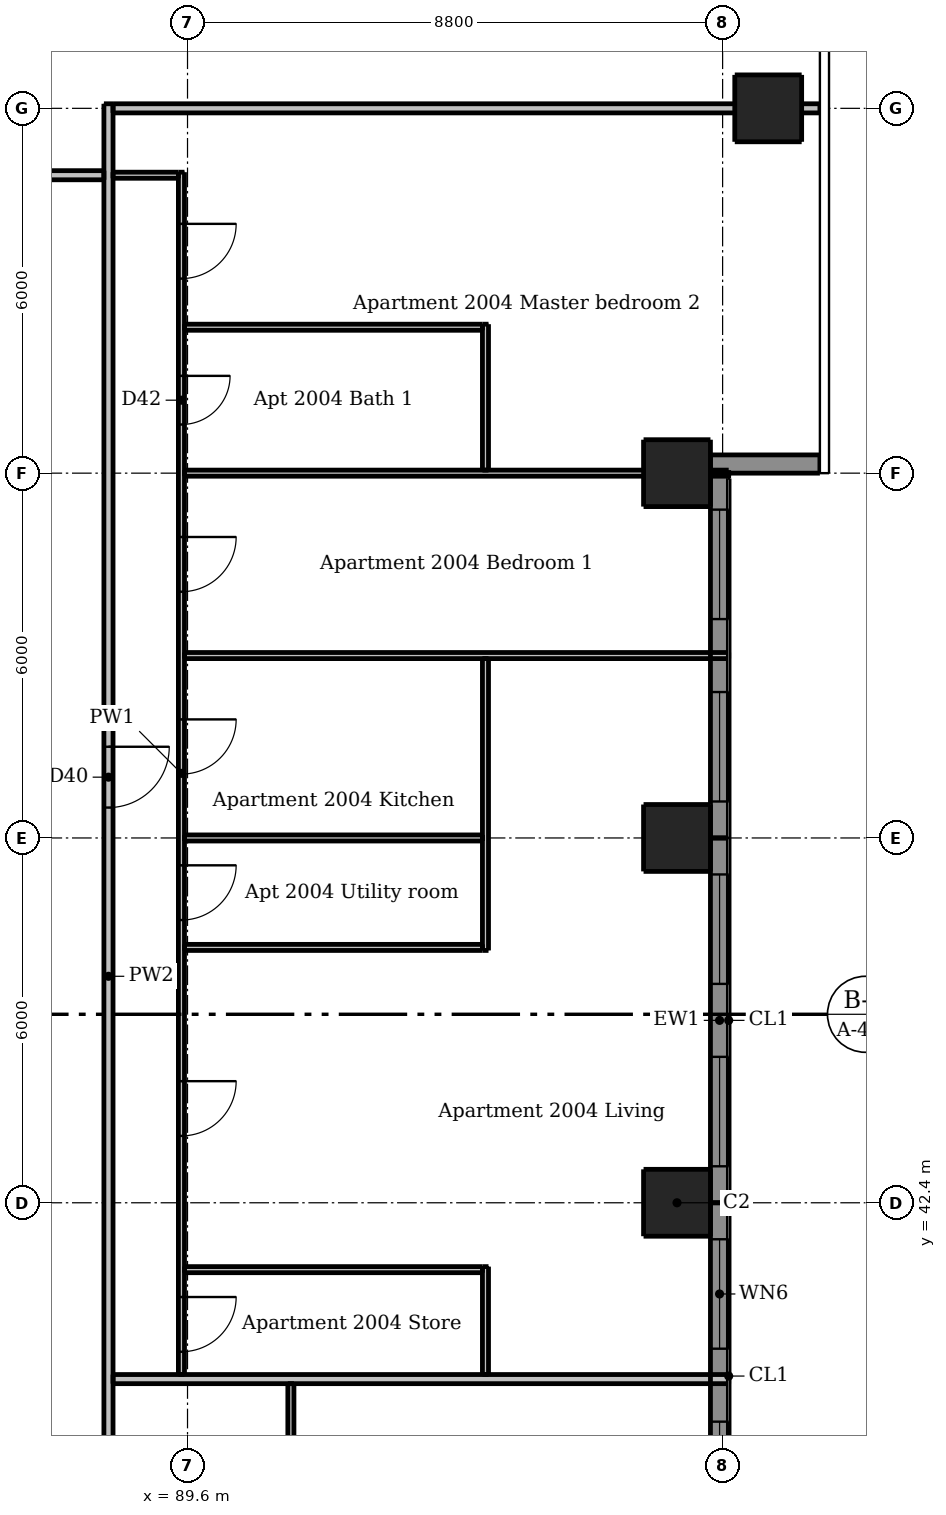
"""IFC4 building model, lengths in metres.
Left out: names, types, materials, properties, quantities, classifications, styles, units other than length and angle.
Written with IfcOpenShell. Run it as: python <this file> out.ifc"""

import sys

from ifc_helpers import new_model, si_unit, direction, frame, frame_2d, origin, origin_2d, place, context, subcontext, project, spatial, rectangle, extrude, element, fill, save


model = new_model("IFC4")
c1 = context("Model", 3, precision=1e-05, world=origin(), true_north=direction((0.0, 1.0)))
c2 = subcontext(c1, "Body", "Model", "MODEL_VIEW")
j1 = project(units=[si_unit("LENGTHUNIT", "METRE"), si_unit("PLANEANGLEUNIT", "RADIAN")], contexts=[c1])
p1 = place(None, origin())
s1 = spatial("IfcSite", under=j1, at=p1, CompositionType="ELEMENT")
p2 = place(p1, origin())
s2 = spatial("IfcBuilding", under=s1, at=p2, CompositionType="ELEMENT")
p3 = place(p2, frame((0.0, 0.0, 78.7)))
s3 = spatial("IfcBuildingStorey", under=s2, at=p3, CompositionType="ELEMENT", Elevation=78.7)
for number, where, z_axis, x_axis in (
    (1, (97.65, 42.4, 0.0), (0.0, 0.0, 1.0), (1.0, 0.0, 0.0)),
    (2, (97.65, 48.4, 0.0), (0.0, 0.0, 1.0), (1.0, 0.0, 0.0)),
    (3, (97.65, 54.4, 0.0), (0.0, 0.0, 1.0), (1.0, 0.0, 0.0)),
    (4, (99.15, 60.4, 0.0), (0.0, 0.0, 1.0), (1.0, 0.0, 0.0)),
):
    element("IfcColumn", number, at=place(p3, frame(where, z_axis=z_axis, x_axis=x_axis)), inside=s3, PredefinedType="COLUMN", context=c2, shape_type="SweptSolid", body=[
        extrude(rectangle(XDim=1.1, YDim=1.1, at=origin_2d()), origin(), (0.0, 0.0, 1.0), 3.05),
    ])
p4 = place(p3, frame((98.2, 54.55, 0.0), z_axis=(0.0, 0.0, 1.0), x_axis=(1.0, 0.0, 0.0)))
e5 = element("IfcWall", 5, at=p4, inside=s3, PredefinedType="SOLIDWALL", context=c2, shape_type="SweptSolid", body=[
    extrude(rectangle(XDim=1.8, YDim=0.3, at=frame_2d((0.9, 0.0))), origin(), (0.0, 0.0, 1.0), 3.05),
])
p5 = place(p3, frame((98.35, 36.7, 0.0), z_axis=(0.0, 0.0, 1.0), x_axis=(0.0, 1.0, 0.0)))
e6 = element("IfcWall", 6, at=p5, inside=s3, PredefinedType="SOLIDWALL", context=c2, shape_type="SweptSolid", body=[
    extrude(rectangle(XDim=5.7, YDim=0.3, at=frame_2d((2.85, 0.0))), origin(), (0.0, 0.0, 1.0), 3.05),
])
p6 = place(p5, frame((0.3, 0.0, 0.15)))
e7 = element("IfcOpeningElement", 7, at=p6, cuts=e6, PredefinedType="OPENING", context=c2, shape_type="SweptSolid", body=[
    extrude(rectangle(XDim=1.8, YDim=2.1, at=frame_2d((0.9, 1.05))), frame((0.0, 0.16, 0.0), z_axis=(0.0, -1.0, 0.0), x_axis=(1.0, 0.0, 0.0)), (0.0, 0.0, 1.0), 0.32),
])
p7 = place(p5, frame((3.3, 0.0, 0.15)))
e8 = element("IfcOpeningElement", 8, at=p7, cuts=e6, PredefinedType="OPENING", context=c2, shape_type="SweptSolid", body=[
    extrude(rectangle(XDim=1.8, YDim=2.1, at=frame_2d((0.9, 1.05))), frame((0.0, 0.16, 0.0), z_axis=(0.0, -1.0, 0.0), x_axis=(1.0, 0.0, 0.0)), (0.0, 0.0, 1.0), 0.32),
])
p8 = place(p3, frame((98.35, 42.4, 0.0), z_axis=(0.0, 0.0, 1.0), x_axis=(0.0, 1.0, 0.0)))
e9 = element("IfcWall", 9, at=p8, inside=s3, PredefinedType="SOLIDWALL", context=c2, shape_type="SweptSolid", body=[
    extrude(rectangle(XDim=6.0, YDim=0.3, at=frame_2d((3.0, 0.0))), origin(), (0.0, 0.0, 1.0), 3.05),
])
p9 = place(p8, frame((0.6, 0.0, 0.15)))
e10 = element("IfcOpeningElement", 10, at=p9, cuts=e9, PredefinedType="OPENING", context=c2, shape_type="SweptSolid", body=[
    extrude(rectangle(XDim=1.8, YDim=2.1, at=frame_2d((0.9, 1.05))), frame((0.0, 0.16, 0.0), z_axis=(0.0, -1.0, 0.0), x_axis=(1.0, 0.0, 0.0)), (0.0, 0.0, 1.0), 0.32),
])
p10 = place(p8, frame((3.6, 0.0, 0.15)))
e11 = element("IfcOpeningElement", 11, at=p10, cuts=e9, PredefinedType="OPENING", context=c2, shape_type="SweptSolid", body=[
    extrude(rectangle(XDim=1.8, YDim=2.1, at=frame_2d((0.9, 1.05))), frame((0.0, 0.16, 0.0), z_axis=(0.0, -1.0, 0.0), x_axis=(1.0, 0.0, 0.0)), (0.0, 0.0, 1.0), 0.32),
])
p11 = place(p3, frame((98.35, 48.4, 0.0), z_axis=(0.0, 0.0, 1.0), x_axis=(0.0, 1.0, 0.0)))
e12 = element("IfcWall", 12, at=p11, inside=s3, PredefinedType="SOLIDWALL", context=c2, shape_type="SweptSolid", body=[
    extrude(rectangle(XDim=6.0, YDim=0.3, at=frame_2d((3.0, 0.0))), origin(), (0.0, 0.0, 1.0), 3.05),
])
p12 = place(p11, frame((0.6, 0.0, 0.15)))
e13 = element("IfcOpeningElement", 13, at=p12, cuts=e12, PredefinedType="OPENING", context=c2, shape_type="SweptSolid", body=[
    extrude(rectangle(XDim=1.8, YDim=2.1, at=frame_2d((0.9, 1.05))), frame((0.0, 0.16, 0.0), z_axis=(0.0, -1.0, 0.0), x_axis=(1.0, 0.0, 0.0)), (0.0, 0.0, 1.0), 0.32),
])
p13 = place(p11, frame((3.6, 0.0, 0.15)))
e14 = element("IfcOpeningElement", 14, at=p13, cuts=e12, PredefinedType="OPENING", context=c2, shape_type="SweptSolid", body=[
    extrude(rectangle(XDim=1.8, YDim=2.1, at=frame_2d((0.9, 1.05))), frame((0.0, 0.16, 0.0), z_axis=(0.0, -1.0, 0.0), x_axis=(1.0, 0.0, 0.0)), (0.0, 0.0, 1.0), 0.32),
])
p14 = place(p3, frame((89.5, 59.35, 0.0), z_axis=(0.0, 0.0, 1.0), x_axis=(0.0, -1.0, 0.0)))
e15 = element("IfcWall", 15, at=p14, inside=s3, PredefinedType="PARTITIONING", context=c2, shape_type="SweptSolid", body=[
    extrude(rectangle(XDim=19.775, YDim=0.1, at=frame_2d((9.888, 0.0))), origin(), (0.0, 0.0, 1.0), 2.51),
])
p15 = place(p14, frame((14.95, 0.0, 0.0)))
e16 = element("IfcOpeningElement", 16, at=p15, cuts=e15, PredefinedType="OPENING", context=c2, shape_type="SweptSolid", body=[
    extrude(rectangle(XDim=0.9, YDim=2.1, at=frame_2d((0.45, 1.05))), frame((0.0, 0.06, 0.0), z_axis=(0.0, -1.0, 0.0), x_axis=(1.0, 0.0, 0.0)), (0.0, 0.0, 1.0), 0.12),
])
p16 = place(p14, frame((9.0, 0.0, 0.0)))
e17 = element("IfcOpeningElement", 17, at=p16, cuts=e15, PredefinedType="OPENING", context=c2, shape_type="SweptSolid", body=[
    extrude(rectangle(XDim=0.9, YDim=2.1, at=frame_2d((0.45, 1.05))), frame((0.0, 0.06, 0.0), z_axis=(0.0, -1.0, 0.0), x_axis=(1.0, 0.0, 0.0)), (0.0, 0.0, 1.0), 0.12),
])
p17 = place(p14, frame((11.4, 0.0, 0.0)))
e18 = element("IfcOpeningElement", 18, at=p17, cuts=e15, PredefinedType="OPENING", context=c2, shape_type="SweptSolid", body=[
    extrude(rectangle(XDim=0.9, YDim=2.1, at=frame_2d((0.45, 1.05))), frame((0.0, 0.06, 0.0), z_axis=(0.0, -1.0, 0.0), x_axis=(1.0, 0.0, 0.0)), (0.0, 0.0, 1.0), 0.12),
])
p18 = place(p14, frame((18.5, 0.0, 0.0)))
e19 = element("IfcOpeningElement", 19, at=p18, cuts=e15, PredefinedType="OPENING", context=c2, shape_type="SweptSolid", body=[
    extrude(rectangle(XDim=0.9, YDim=2.1, at=frame_2d((0.45, 1.05))), frame((0.0, 0.06, 0.0), z_axis=(0.0, -1.0, 0.0), x_axis=(1.0, 0.0, 0.0)), (0.0, 0.0, 1.0), 0.12),
])
p19 = place(p14, frame((6.0, 0.0, 0.0)))
e20 = element("IfcOpeningElement", 20, at=p19, cuts=e15, PredefinedType="OPENING", context=c2, shape_type="SweptSolid", body=[
    extrude(rectangle(XDim=0.9, YDim=2.1, at=frame_2d((0.45, 1.05))), frame((0.0, 0.06, 0.0), z_axis=(0.0, -1.0, 0.0), x_axis=(1.0, 0.0, 0.0)), (0.0, 0.0, 1.0), 0.12),
])
p20 = place(p14, frame((0.85, 0.0, 0.0)))
e21 = element("IfcOpeningElement", 21, at=p20, cuts=e15, PredefinedType="OPENING", context=c2, shape_type="SweptSolid", body=[
    extrude(rectangle(XDim=0.9, YDim=2.1, at=frame_2d((0.45, 1.05))), frame((0.0, 0.06, 0.0), z_axis=(0.0, -1.0, 0.0), x_axis=(1.0, 0.0, 0.0)), (0.0, 0.0, 1.0), 0.12),
])
p21 = place(p14, frame((3.35, 0.0, 0.0)))
e22 = element("IfcOpeningElement", 22, at=p21, cuts=e15, PredefinedType="OPENING", context=c2, shape_type="SweptSolid", body=[
    extrude(rectangle(XDim=0.8, YDim=2.1, at=frame_2d((0.4, 1.05))), frame((0.0, 0.06, 0.0), z_axis=(0.0, -1.0, 0.0), x_axis=(1.0, 0.0, 0.0)), (0.0, 0.0, 1.0), 0.12),
])
p22 = place(p3, frame((91.3, 33.45, 0.0), z_axis=(0.0, 0.0, 1.0), x_axis=(0.0, 1.0, 0.0)))
e23 = element("IfcWall", 23, at=p22, inside=s3, PredefinedType="PARTITIONING", context=c2, shape_type="SweptSolid", body=[
    extrude(rectangle(XDim=5.975, YDim=0.1, at=frame_2d((2.988, 0.0))), origin(), (0.0, 0.0, 1.0), 3.05),
])
p23 = place(p22, frame((3.8, 0.0, 0.0)))
e24 = element("IfcOpeningElement", 24, at=p23, cuts=e23, PredefinedType="OPENING", context=c2, shape_type="SweptSolid", body=[
    extrude(rectangle(XDim=0.8, YDim=2.1, at=frame_2d((0.4, 1.05))), frame((0.0, 0.06, 0.0), z_axis=(0.0, -1.0, 0.0), x_axis=(1.0, 0.0, 0.0)), (0.0, 0.0, 1.0), 0.12),
])
p24 = place(p3, frame((94.5, 39.575, 0.0), z_axis=(0.0, 0.0, 1.0), x_axis=(0.0, 1.0, 0.0)))
e25 = element("IfcWall", 25, at=p24, inside=s3, PredefinedType="PARTITIONING", context=c2, shape_type="SweptSolid", body=[
    extrude(rectangle(XDim=1.775, YDim=0.1, at=frame_2d((0.888, 0.0))), origin(), (0.0, 0.0, 1.0), 3.05),
])
p25 = place(p3, frame((94.5, 46.55, 0.0), z_axis=(0.0, 0.0, 1.0), x_axis=(0.0, 1.0, 0.0)))
e26 = element("IfcWall", 26, at=p25, inside=s3, PredefinedType="PARTITIONING", context=c2, shape_type="SweptSolid", body=[
    extrude(rectangle(XDim=4.8, YDim=0.1, at=frame_2d((2.4, 0.0))), origin(), (0.0, 0.0, 1.0), 3.05),
])
p26 = place(p3, frame((94.5, 54.45, 0.0), z_axis=(0.0, 0.0, 1.0), x_axis=(0.0, 1.0, 0.0)))
e27 = element("IfcWall", 27, at=p26, inside=s3, PredefinedType="PARTITIONING", context=c2, shape_type="SweptSolid", body=[
    extrude(rectangle(XDim=2.4, YDim=0.1, at=frame_2d((1.2, 0.0))), origin(), (0.0, 0.0, 1.0), 3.05),
])
p27 = place(p3, frame((88.375, 59.3, 0.0), z_axis=(0.0, 0.0, 1.0), x_axis=(1.0, 0.0, 0.0)))
e28 = element("IfcWall", 28, at=p27, inside=s3, PredefinedType="PARTITIONING", context=c2, shape_type="SweptSolid", body=[
    extrude(rectangle(XDim=1.075, YDim=0.1, at=frame_2d((0.538, 0.0))), origin(), (0.0, 0.0, 1.0), 3.05),
])
p28 = place(p3, frame((89.55, 56.8, 0.0), z_axis=(0.0, 0.0, 1.0), x_axis=(1.0, 0.0, 0.0)))
e29 = element("IfcWall", 29, at=p28, inside=s3, PredefinedType="PARTITIONING", context=c2, shape_type="SweptSolid", body=[
    extrude(rectangle(XDim=4.9, YDim=0.1, at=frame_2d((2.45, 0.0))), origin(), (0.0, 0.0, 1.0), 3.05),
])
p29 = place(p3, frame((89.55, 54.4, 0.0), z_axis=(0.0, 0.0, 1.0), x_axis=(1.0, 0.0, 0.0)))
e30 = element("IfcWall", 30, at=p29, inside=s3, PredefinedType="PARTITIONING", context=c2, shape_type="SweptSolid", body=[
    extrude(rectangle(XDim=8.95, YDim=0.1, at=frame_2d((4.475, 0.0))), origin(), (0.0, 0.0, 1.0), 2.516),
])
p30 = place(p3, frame((89.55, 51.4, 0.0), z_axis=(0.0, 0.0, 1.0), x_axis=(1.0, 0.0, 0.0)))
e31 = element("IfcWall", 31, at=p30, inside=s3, PredefinedType="PARTITIONING", context=c2, shape_type="SweptSolid", body=[
    extrude(rectangle(XDim=8.95, YDim=0.1, at=frame_2d((4.475, 0.0))), origin(), (0.0, 0.0, 1.0), 3.05),
])
p31 = place(p3, frame((89.55, 48.4, 0.0), z_axis=(0.0, 0.0, 1.0), x_axis=(1.0, 0.0, 0.0)))
e32 = element("IfcWall", 32, at=p31, inside=s3, PredefinedType="PARTITIONING", context=c2, shape_type="SweptSolid", body=[
    extrude(rectangle(XDim=4.9, YDim=0.1, at=frame_2d((2.45, 0.0))), origin(), (0.0, 0.0, 1.0), 2.516),
])
for number, where, z_axis, x_axis in (
    (33, (89.55, 46.6, 0.0), (0.0, 0.0, 1.0), (1.0, 0.0, 0.0)),
    (34, (89.55, 41.3, 0.0), (0.0, 0.0, 1.0), (1.0, 0.0, 0.0)),
):
    element("IfcWall", number, at=place(p3, frame(where, z_axis=z_axis, x_axis=x_axis)), inside=s3, PredefinedType="PARTITIONING", context=c2, shape_type="SweptSolid", body=[
        extrude(rectangle(XDim=4.9, YDim=0.1, at=frame_2d((2.45, 0.0))), origin(), (0.0, 0.0, 1.0), 3.05),
    ])
p32 = place(p3, frame((88.3, 60.475, 0.0), z_axis=(0.0, 0.0, 1.0), x_axis=(0.0, -1.0, 0.0)))
e35 = element("IfcWall", 35, at=p32, inside=s3, PredefinedType="PARTITIONING", context=c2, shape_type="SweptSolid", body=[
    extrude(rectangle(XDim=28.7, YDim=0.15, at=frame_2d((14.35, 0.0))), origin(), (0.0, 0.0, 1.0), 3.05),
])
p33 = place(p32, frame((27.425, 0.0, 0.0)))
e36 = element("IfcOpeningElement", 36, at=p33, cuts=e35, PredefinedType="OPENING", context=c2, shape_type="SweptSolid", body=[
    extrude(rectangle(XDim=1.0, YDim=2.1, at=frame_2d((0.5, 1.05))), frame((0.0, 0.085, 0.0), z_axis=(0.0, -1.0, 0.0), x_axis=(1.0, 0.0, 0.0)), (0.0, 0.0, 1.0), 0.17),
])
p34 = place(p32, frame((10.575, 0.0, 0.0)))
e37 = element("IfcOpeningElement", 37, at=p34, cuts=e35, PredefinedType="OPENING", context=c2, shape_type="SweptSolid", body=[
    extrude(rectangle(XDim=1.0, YDim=2.1, at=frame_2d((0.5, 1.05))), frame((0.0, 0.085, 0.0), z_axis=(0.0, -1.0, 0.0), x_axis=(1.0, 0.0, 0.0)), (0.0, 0.0, 1.0), 0.17),
])
p35 = place(p3, frame((88.375, 60.4, 0.0), z_axis=(0.0, 0.0, 1.0), x_axis=(1.0, 0.0, 0.0)))
e38 = element("IfcWall", 38, at=p35, inside=s3, PredefinedType="PARTITIONING", context=c2, shape_type="SweptSolid", body=[
    extrude(rectangle(XDim=11.625, YDim=0.15, at=frame_2d((5.812, 0.0))), origin(), (0.0, 0.0, 1.0), 2.516),
])
p36 = place(p3, frame((59.675, 59.3, 0.0), z_axis=(0.0, 0.0, 1.0), x_axis=(1.0, 0.0, 0.0)))
e39 = element("IfcWall", 39, at=p36, inside=s3, PredefinedType="PARTITIONING", context=c2, shape_type="SweptSolid", body=[
    extrude(rectangle(XDim=28.55, YDim=0.15, at=frame_2d((14.275, 0.0))), origin(), (0.0, 0.0, 1.0), 3.05),
])
p37 = place(p36, frame((8.975, 0.0, 0.0)))
e40 = element("IfcOpeningElement", 40, at=p37, cuts=e39, PredefinedType="OPENING", context=c2, shape_type="SweptSolid", body=[
    extrude(rectangle(XDim=1.0, YDim=2.1, at=frame_2d((0.5, 1.05))), frame((0.0, 0.085, 0.0), z_axis=(0.0, -1.0, 0.0), x_axis=(1.0, 0.0, 0.0)), (0.0, 0.0, 1.0), 0.17),
])
p38 = place(p36, frame((25.775, 0.0, 0.0)))
e41 = element("IfcOpeningElement", 41, at=p38, cuts=e39, PredefinedType="OPENING", context=c2, shape_type="SweptSolid", body=[
    extrude(rectangle(XDim=1.0, YDim=2.1, at=frame_2d((0.5, 1.05))), frame((0.0, 0.085, 0.0), z_axis=(0.0, -1.0, 0.0), x_axis=(1.0, 0.0, 0.0)), (0.0, 0.0, 1.0), 0.17),
])
p39 = place(p3, frame((88.375, 39.5, 0.0), z_axis=(0.0, 0.0, 1.0), x_axis=(1.0, 0.0, 0.0)))
e42 = element("IfcWall", 42, at=p39, inside=s3, PredefinedType="PARTITIONING", context=c2, shape_type="SweptSolid", body=[
    extrude(rectangle(XDim=10.125, YDim=0.15, at=frame_2d((5.062, 0.0))), origin(), (0.0, 0.0, 1.0), 3.05),
])
p40 = place(p6, origin())
e43 = element("IfcWindow", 43, at=p40, inside=s3, PartitioningType="DOUBLE_PANEL_VERTICAL", PredefinedType="WINDOW", context=c2, shape_type="SweptSolid", body=[
    extrude(rectangle(XDim=1.8, YDim=2.1, at=frame_2d((0.9, 1.05))), frame((0.0, 0.03, 0.0), z_axis=(0.0, -1.0, 0.0), x_axis=(1.0, 0.0, 0.0)), (0.0, 0.0, 1.0), 0.06),
])
fill(e7, e43)
p41 = place(p7, origin())
e44 = element("IfcWindow", 44, at=p41, inside=s3, PartitioningType="DOUBLE_PANEL_VERTICAL", PredefinedType="WINDOW", context=c2, shape_type="SweptSolid", body=[
    extrude(rectangle(XDim=1.8, YDim=2.1, at=frame_2d((0.9, 1.05))), frame((0.0, 0.03, 0.0), z_axis=(0.0, -1.0, 0.0), x_axis=(1.0, 0.0, 0.0)), (0.0, 0.0, 1.0), 0.06),
])
fill(e8, e44)
p42 = place(p9, origin())
e45 = element("IfcWindow", 45, at=p42, inside=s3, PartitioningType="DOUBLE_PANEL_VERTICAL", PredefinedType="WINDOW", context=c2, shape_type="SweptSolid", body=[
    extrude(rectangle(XDim=1.8, YDim=2.1, at=frame_2d((0.9, 1.05))), frame((0.0, 0.03, 0.0), z_axis=(0.0, -1.0, 0.0), x_axis=(1.0, 0.0, 0.0)), (0.0, 0.0, 1.0), 0.06),
])
fill(e10, e45)
p43 = place(p10, origin())
e46 = element("IfcWindow", 46, at=p43, inside=s3, PartitioningType="DOUBLE_PANEL_VERTICAL", PredefinedType="WINDOW", context=c2, shape_type="SweptSolid", body=[
    extrude(rectangle(XDim=1.8, YDim=2.1, at=frame_2d((0.9, 1.05))), frame((0.0, 0.03, 0.0), z_axis=(0.0, -1.0, 0.0), x_axis=(1.0, 0.0, 0.0)), (0.0, 0.0, 1.0), 0.06),
])
fill(e11, e46)
p44 = place(p12, origin())
e47 = element("IfcWindow", 47, at=p44, inside=s3, PartitioningType="DOUBLE_PANEL_VERTICAL", PredefinedType="WINDOW", context=c2, shape_type="SweptSolid", body=[
    extrude(rectangle(XDim=1.8, YDim=2.1, at=frame_2d((0.9, 1.05))), frame((0.0, 0.03, 0.0), z_axis=(0.0, -1.0, 0.0), x_axis=(1.0, 0.0, 0.0)), (0.0, 0.0, 1.0), 0.06),
])
fill(e13, e47)
p45 = place(p13, origin())
e48 = element("IfcWindow", 48, at=p45, inside=s3, PartitioningType="DOUBLE_PANEL_VERTICAL", PredefinedType="WINDOW", context=c2, shape_type="SweptSolid", body=[
    extrude(rectangle(XDim=1.8, YDim=2.1, at=frame_2d((0.9, 1.05))), frame((0.0, 0.03, 0.0), z_axis=(0.0, -1.0, 0.0), x_axis=(1.0, 0.0, 0.0)), (0.0, 0.0, 1.0), 0.06),
])
fill(e14, e48)
p46 = place(p34, origin())
e49 = element("IfcDoor", 49, at=p46, inside=s3, OperationType="SINGLE_SWING_LEFT", PredefinedType="DOOR", context=c2, shape_type="SweptSolid", body=[
    extrude(rectangle(XDim=1.0, YDim=2.1, at=frame_2d((0.5, 1.05))), frame((0.0, 0.025, 0.0), z_axis=(0.0, -1.0, 0.0), x_axis=(1.0, 0.0, 0.0)), (0.0, 0.0, 1.0), 0.05),
])
fill(e37, e49)
p47 = place(p15, origin())
e50 = element("IfcDoor", 50, at=p47, inside=s3, OperationType="SINGLE_SWING_LEFT", PredefinedType="DOOR", context=c2, shape_type="SweptSolid", body=[
    extrude(rectangle(XDim=0.9, YDim=2.1, at=frame_2d((0.45, 1.05))), frame((0.0, 0.025, 0.0), z_axis=(0.0, -1.0, 0.0), x_axis=(1.0, 0.0, 0.0)), (0.0, 0.0, 1.0), 0.05),
])
fill(e16, e50)
p48 = place(p16, origin())
e51 = element("IfcDoor", 51, at=p48, inside=s3, OperationType="SINGLE_SWING_LEFT", PredefinedType="DOOR", context=c2, shape_type="SweptSolid", body=[
    extrude(rectangle(XDim=0.9, YDim=2.1, at=frame_2d((0.45, 1.05))), frame((0.0, 0.025, 0.0), z_axis=(0.0, -1.0, 0.0), x_axis=(1.0, 0.0, 0.0)), (0.0, 0.0, 1.0), 0.05),
])
fill(e17, e51)
p49 = place(p17, origin())
e52 = element("IfcDoor", 52, at=p49, inside=s3, OperationType="SINGLE_SWING_LEFT", PredefinedType="DOOR", context=c2, shape_type="SweptSolid", body=[
    extrude(rectangle(XDim=0.9, YDim=2.1, at=frame_2d((0.45, 1.05))), frame((0.0, 0.025, 0.0), z_axis=(0.0, -1.0, 0.0), x_axis=(1.0, 0.0, 0.0)), (0.0, 0.0, 1.0), 0.05),
])
fill(e18, e52)
p50 = place(p18, origin())
e53 = element("IfcDoor", 53, at=p50, inside=s3, OperationType="SINGLE_SWING_LEFT", PredefinedType="DOOR", context=c2, shape_type="SweptSolid", body=[
    extrude(rectangle(XDim=0.9, YDim=2.1, at=frame_2d((0.45, 1.05))), frame((0.0, 0.025, 0.0), z_axis=(0.0, -1.0, 0.0), x_axis=(1.0, 0.0, 0.0)), (0.0, 0.0, 1.0), 0.05),
])
fill(e19, e53)
p51 = place(p19, origin())
e54 = element("IfcDoor", 54, at=p51, inside=s3, OperationType="SINGLE_SWING_LEFT", PredefinedType="DOOR", context=c2, shape_type="SweptSolid", body=[
    extrude(rectangle(XDim=0.9, YDim=2.1, at=frame_2d((0.45, 1.05))), frame((0.0, 0.025, 0.0), z_axis=(0.0, -1.0, 0.0), x_axis=(1.0, 0.0, 0.0)), (0.0, 0.0, 1.0), 0.05),
])
fill(e20, e54)
p52 = place(p20, origin())
e55 = element("IfcDoor", 55, at=p52, inside=s3, OperationType="SINGLE_SWING_LEFT", PredefinedType="DOOR", context=c2, shape_type="SweptSolid", body=[
    extrude(rectangle(XDim=0.9, YDim=2.1, at=frame_2d((0.45, 1.05))), frame((0.0, 0.025, 0.0), z_axis=(0.0, -1.0, 0.0), x_axis=(1.0, 0.0, 0.0)), (0.0, 0.0, 1.0), 0.05),
])
fill(e21, e55)
p53 = place(p21, origin())
e56 = element("IfcDoor", 56, at=p53, inside=s3, OperationType="SINGLE_SWING_LEFT", PredefinedType="DOOR", context=c2, shape_type="SweptSolid", body=[
    extrude(rectangle(XDim=0.8, YDim=2.1, at=frame_2d((0.4, 1.05))), frame((0.0, 0.025, 0.0), z_axis=(0.0, -1.0, 0.0), x_axis=(1.0, 0.0, 0.0)), (0.0, 0.0, 1.0), 0.05),
])
fill(e22, e56)
save(model, sys.argv[1])
